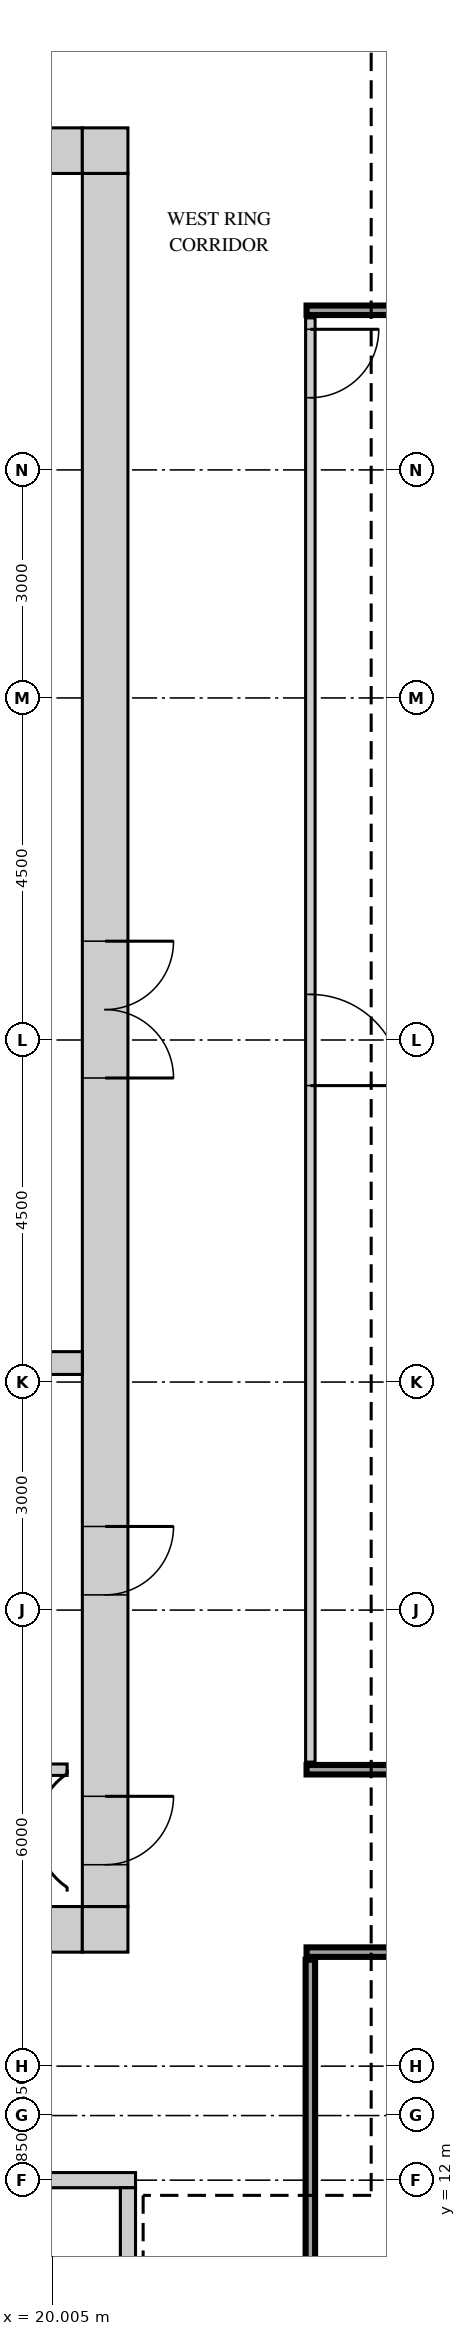
"""IFC4 building model, lengths in metres.
Left out: names, types, materials, properties, quantities, classifications, styles, units other than length and angle.
Written with IfcOpenShell. Run it as: python <this file> out.ifc"""

import sys

from ifc_helpers import new_model, si_unit, direction, frame, frame_2d, origin, place, context, subcontext, project, spatial, rectangle, extrude, source, transform, mapped, element, fill, save


model = new_model("IFC4")
c1 = context("Model", 3, precision=1e-05, world=origin(), true_north=direction((0.0, 1.0)))
c2 = subcontext(c1, "Body", "Model", "MODEL_VIEW")
j1 = project(units=[si_unit("LENGTHUNIT", "METRE"), si_unit("PLANEANGLEUNIT", "RADIAN")], contexts=[c1])
p1 = place(None, origin())
s1 = spatial("IfcSite", under=j1, at=p1, CompositionType="ELEMENT")
p2 = place(p1, origin())
s2 = spatial("IfcBuilding", under=s1, at=p2, CompositionType="ELEMENT")
p3 = place(p2, frame((0.0, 0.0, 322.2)))
s3 = spatial("IfcBuildingStorey", under=s2, at=p3, CompositionType="ELEMENT", Elevation=322.2)
m1 = source(origin(), c2, "Body", "SweptSolid", [
    extrude(rectangle(XDim=14.4, YDim=0.6, at=frame_2d((7.2, 0.0))), origin(), (0.0, 0.0, 1.0), 3.75),
])
p4 = place(p3, frame((6.0, 38.7, 0.0), z_axis=(0.0, 0.0, 1.0), x_axis=(1.0, 0.0, 0.0)))
e1 = element("IfcWall", 1, at=p4, inside=s3, PredefinedType="SHEAR", context=c2, shape_type="MappedRepresentation", body=[
    mapped(m1, transform((0.0, 0.0, 0.0))),
])
m2 = source(origin(), c2, "Body", "SweptSolid", [
    extrude(rectangle(XDim=0.9, YDim=2.1, at=frame_2d((0.45, 1.05))), frame((0.0, 0.31, 0.0), z_axis=(0.0, -1.0, 0.0), x_axis=(1.0, 0.0, 0.0)), (0.0, 0.0, 1.0), 0.62),
])
p5 = place(p4, frame((2.05, 0.0, 0.0)))
e2 = element("IfcOpeningElement", 2, at=p5, cuts=e1, PredefinedType="OPENING", context=c2, shape_type="MappedRepresentation", body=[
    mapped(m2, transform((0.0, 0.0, 0.0))),
])
p6 = place(p4, frame((5.45, 0.0, 0.0)))
e3 = element("IfcOpeningElement", 3, at=p6, cuts=e1, PredefinedType="OPENING", context=c2, shape_type="MappedRepresentation", body=[
    mapped(m2, transform((0.0, 0.0, 0.0))),
])
m3 = source(origin(), c2, "Body", "SweptSolid", [
    extrude(rectangle(XDim=1.0, YDim=2.1, at=frame_2d((0.5, 1.05))), frame((0.0, 0.31, 0.0), z_axis=(0.0, -1.0, 0.0), x_axis=(1.0, 0.0, 0.0)), (0.0, 0.0, 1.0), 0.62),
])
p7 = place(p4, frame((8.8, 0.0, 0.0)))
e4 = element("IfcOpeningElement", 4, at=p7, cuts=e1, PredefinedType="OPENING", context=c2, shape_type="MappedRepresentation", body=[
    mapped(m3, transform((0.0, 0.0, 0.0))),
])
p8 = place(p4, frame((12.15, 0.0, 0.0)))
e5 = element("IfcOpeningElement", 5, at=p8, cuts=e1, PredefinedType="OPENING", context=c2, shape_type="MappedRepresentation", body=[
    mapped(m2, transform((0.0, 0.0, 0.0))),
])
m4 = source(origin(), c2, "Body", "SweptSolid", [
    extrude(rectangle(XDim=0.6, YDim=0.6, at=frame_2d((0.3, 0.0))), origin(), (0.0, 0.0, 1.0), 3.75),
])
p9 = place(p3, frame((20.4, 38.7, 0.0), z_axis=(0.0, 0.0, 1.0), x_axis=(1.0, 0.0, 0.0)))
e6 = element("IfcWall", 6, at=p9, inside=s3, PredefinedType="SHEAR", context=c2, shape_type="MappedRepresentation", body=[
    mapped(m4, transform((0.0, 0.0, 0.0))),
])
p10 = place(p3, frame((6.0, 15.3, 0.0), z_axis=(0.0, 0.0, 1.0), x_axis=(1.0, 0.0, 0.0)))
e7 = element("IfcWall", 7, at=p10, inside=s3, PredefinedType="SHEAR", context=c2, shape_type="MappedRepresentation", body=[
    mapped(m1, transform((0.0, 0.0, 0.0))),
])
m5 = source(origin(), c2, "Body", "SweptSolid", [
    extrude(rectangle(XDim=1.2, YDim=2.1, at=frame_2d((0.6, 1.05))), frame((0.0, 0.31, 0.0), z_axis=(0.0, -1.0, 0.0), x_axis=(1.0, 0.0, 0.0)), (0.0, 0.0, 1.0), 0.62),
])
p11 = place(p10, frame((6.2, 0.0, 0.0)))
e8 = element("IfcOpeningElement", 8, at=p11, cuts=e7, PredefinedType="OPENING", context=c2, shape_type="MappedRepresentation", body=[
    mapped(m5, transform((0.0, 0.0, 0.0))),
])
p12 = place(p10, frame((2.85, 0.0, 0.0)))
e9 = element("IfcOpeningElement", 9, at=p12, cuts=e7, PredefinedType="OPENING", context=c2, shape_type="MappedRepresentation", body=[
    mapped(m5, transform((0.0, 0.0, 0.0))),
])
p13 = place(p10, frame((8.7, 0.0, 0.0)))
e10 = element("IfcOpeningElement", 10, at=p13, cuts=e7, PredefinedType="OPENING", context=c2, shape_type="MappedRepresentation", body=[
    mapped(m3, transform((0.0, 0.0, 0.0))),
])
p14 = place(p3, frame((20.4, 15.3, 0.0), z_axis=(0.0, 0.0, 1.0), x_axis=(1.0, 0.0, 0.0)))
e11 = element("IfcWall", 11, at=p14, inside=s3, PredefinedType="SHEAR", context=c2, shape_type="MappedRepresentation", body=[
    mapped(m4, transform((0.0, 0.0, 0.0))),
])
m6 = source(origin(), c2, "Body", "SweptSolid", [
    extrude(rectangle(XDim=22.8, YDim=0.6, at=frame_2d((11.4, 0.0))), origin(), (0.0, 0.0, 1.0), 3.75),
])
p15 = place(p3, frame((20.7, 15.6, 0.0), z_axis=(0.0, 0.0, 1.0), x_axis=(0.0, 1.0, 0.0)))
e12 = element("IfcWall", 12, at=p15, inside=s3, PredefinedType="SHEAR", context=c2, shape_type="MappedRepresentation", body=[
    mapped(m6, transform((0.0, 0.0, 0.0))),
])
m7 = source(origin(), c2, "Body", "SweptSolid", [
    extrude(rectangle(XDim=1.8, YDim=2.1, at=frame_2d((0.9, 1.05))), frame((0.0, 0.31, 0.0), z_axis=(0.0, -1.0, 0.0), x_axis=(1.0, 0.0, 0.0)), (0.0, 0.0, 1.0), 0.62),
])
p16 = place(p15, frame((10.9, 0.0, 0.0)))
e13 = element("IfcOpeningElement", 13, at=p16, cuts=e12, PredefinedType="OPENING", context=c2, shape_type="MappedRepresentation", body=[
    mapped(m7, transform((0.0, 0.0, 0.0))),
])
p17 = place(p15, frame((0.55, 0.0, 0.0)))
e14 = element("IfcOpeningElement", 14, at=p17, cuts=e12, PredefinedType="OPENING", context=c2, shape_type="MappedRepresentation", body=[
    mapped(m2, transform((0.0, 0.0, 0.0))),
])
p18 = place(p15, frame((4.1, 0.0, 0.0)))
e15 = element("IfcOpeningElement", 15, at=p18, cuts=e12, PredefinedType="OPENING", context=c2, shape_type="MappedRepresentation", body=[
    mapped(m2, transform((0.0, 0.0, 0.0))),
])
m8 = source(origin(), c2, "Body", "SweptSolid", [
    extrude(rectangle(XDim=7.2, YDim=0.2, at=frame_2d((3.6, 0.0))), origin(), (0.0, 0.0, 1.0), 3.75),
])
p19 = place(p3, frame((13.9, 12.0, 0.0), z_axis=(0.0, 0.0, 1.0), x_axis=(1.0, 0.0, 0.0)))
e16 = element("IfcWall", 16, at=p19, inside=s3, PredefinedType="SHEAR", context=c2, shape_type="MappedRepresentation", body=[
    mapped(m8, transform((0.0, 0.0, 0.0))),
])
m9 = source(origin(), c2, "Body", "SweptSolid", [
    extrude(rectangle(XDim=3.35, YDim=0.2, at=frame_2d((1.675, 0.0))), origin(), (0.0, 0.0, 1.0), 3.75),
])
p20 = place(p3, frame((21.0, 8.55, 0.0), z_axis=(0.0, 0.0, 1.0), x_axis=(0.0, 1.0, 0.0)))
e17 = element("IfcWall", 17, at=p20, inside=s3, PredefinedType="SHEAR", context=c2, shape_type="MappedRepresentation", body=[
    mapped(m9, transform((0.0, 0.0, 0.0))),
])
m10 = source(origin(), c2, "Body", "SweptSolid", [
    extrude(rectangle(XDim=13.2, YDim=0.3, at=frame_2d((6.6, 0.0))), origin(), (0.0, 0.0, 1.0), 3.75),
])
p21 = place(p3, frame((7.2, 22.75, 0.0), z_axis=(0.0, 0.0, 1.0), x_axis=(1.0, 0.0, 0.0)))
e18 = element("IfcWall", 18, at=p21, inside=s3, PredefinedType="STANDARD", context=c2, shape_type="MappedRepresentation", body=[
    mapped(m10, transform((0.0, 0.0, 0.0))),
])
m11 = source(origin(), c2, "Body", "SweptSolid", [
    extrude(rectangle(XDim=8.75, YDim=0.125, at=frame_2d((4.375, 0.0))), origin(), (0.0, 0.0, 1.0), 3.8),
])
p22 = place(p3, frame((23.4, 6.15, 0.0), z_axis=(0.0, 0.0, 1.0), x_axis=(0.0, 1.0, 0.0)))
e19 = element("IfcWall", 19, at=p22, inside=s3, PredefinedType="PARTITIONING", context=c2, shape_type="MappedRepresentation", body=[
    mapped(m11, transform((0.0, 0.0, 0.0))),
])
m12 = source(origin(), c2, "Body", "SweptSolid", [
    extrude(rectangle(XDim=19.1, YDim=0.125, at=frame_2d((9.55, 0.0))), origin(), (0.0, 0.0, 1.0), 3.8),
])
p23 = place(p3, frame((23.35, 15.0, 0.0), z_axis=(0.0, 0.0, 1.0), x_axis=(1.0, 0.0, 0.0)))
e20 = element("IfcWall", 20, at=p23, inside=s3, PredefinedType="PARTITIONING", context=c2, shape_type="MappedRepresentation", body=[
    mapped(m12, transform((0.0, 0.0, 0.0))),
])
m13 = source(origin(), c2, "Body", "SweptSolid", [
    extrude(rectangle(XDim=0.9, YDim=2.1, at=frame_2d((0.45, 1.05))), frame((0.0, 0.073, 0.0), z_axis=(0.0, -1.0, 0.0), x_axis=(1.0, 0.0, 0.0)), (0.0, 0.0, 1.0), 0.145),
])
p24 = place(p23, frame((5.3, 0.0, 0.0)))
e21 = element("IfcOpeningElement", 21, at=p24, cuts=e20, PredefinedType="OPENING", context=c2, shape_type="MappedRepresentation", body=[
    mapped(m13, transform((0.0, 0.0, 0.0))),
])
p25 = place(p23, frame((13.3, 0.0, 0.0)))
e22 = element("IfcOpeningElement", 22, at=p25, cuts=e20, PredefinedType="OPENING", context=c2, shape_type="MappedRepresentation", body=[
    mapped(m13, transform((0.0, 0.0, 0.0))),
])
m14 = source(origin(), c2, "Body", "SweptSolid", [
    extrude(rectangle(XDim=4.0, YDim=0.15, at=frame_2d((2.0, 0.0))), origin(), (0.0, 0.0, 1.0), 3.8),
])
p26 = place(p3, frame((16.2, 17.4, 0.0), z_axis=(0.0, 0.0, 1.0), x_axis=(1.0, 0.0, 0.0)))
e23 = element("IfcWall", 23, at=p26, inside=s3, PredefinedType="PARTITIONING", context=c2, shape_type="MappedRepresentation", body=[
    mapped(m14, transform((0.0, 0.0, 0.0))),
])
m15 = source(origin(), c2, "Body", "SweptSolid", [
    extrude(rectangle(XDim=16.7, YDim=0.125, at=frame_2d((8.35, 0.0))), origin(), (0.0, 0.0, 1.0), 3.8),
])
p27 = place(p3, frame((23.35, 17.4, 0.0), z_axis=(0.0, 0.0, 1.0), x_axis=(1.0, 0.0, 0.0)))
e24 = element("IfcWall", 24, at=p27, inside=s3, PredefinedType="PARTITIONING", context=c2, shape_type="MappedRepresentation", body=[
    mapped(m15, transform((0.0, 0.0, 0.0))),
])
m16 = source(origin(), c2, "Body", "SweptSolid", [
    extrude(rectangle(XDim=19.0, YDim=0.125, at=frame_2d((9.5, 0.0))), origin(), (0.0, 0.0, 1.0), 3.8),
])
p28 = place(p3, frame((23.4, 17.5, 0.0), z_axis=(0.0, 0.0, 1.0), x_axis=(0.0, 1.0, 0.0)))
e25 = element("IfcWall", 25, at=p28, inside=s3, PredefinedType="PARTITIONING", context=c2, shape_type="MappedRepresentation", body=[
    mapped(m16, transform((0.0, 0.0, 0.0))),
])
m17 = source(origin(), c2, "Body", "SweptSolid", [
    extrude(rectangle(XDim=1.2, YDim=2.1, at=frame_2d((0.6, 1.05))), frame((0.0, 0.073, 0.0), z_axis=(0.0, -1.0, 0.0), x_axis=(1.0, 0.0, 0.0)), (0.0, 0.0, 1.0), 0.145),
])
p29 = place(p28, frame((8.9, 0.0, 0.0)))
e26 = element("IfcOpeningElement", 26, at=p29, cuts=e25, PredefinedType="OPENING", context=c2, shape_type="MappedRepresentation", body=[
    mapped(m17, transform((0.0, 0.0, 0.0))),
])
p30 = place(p28, frame((17.95, 0.0, 0.0)))
e27 = element("IfcOpeningElement", 27, at=p30, cuts=e25, PredefinedType="OPENING", context=c2, shape_type="MappedRepresentation", body=[
    mapped(m13, transform((0.0, 0.0, 0.0))),
])
p31 = place(p3, frame((23.35, 36.6, 0.0), z_axis=(0.0, 0.0, 1.0), x_axis=(1.0, 0.0, 0.0)))
e28 = element("IfcWall", 28, at=p31, inside=s3, PredefinedType="PARTITIONING", context=c2, shape_type="MappedRepresentation", body=[
    mapped(m15, transform((0.0, 0.0, 0.0))),
])
m18 = source(origin(), c2, "Body", "SweptSolid", [
    extrude(rectangle(XDim=1.8, YDim=2.1, at=frame_2d((0.9, 1.05))), frame((0.0, 0.25, 0.0), z_axis=(0.0, -1.0, 0.0), x_axis=(1.0, 0.0, 0.0)), (0.0, 0.0, 1.0), 0.5),
])
p32 = place(p16, origin())
e29 = element("IfcDoor", 29, at=p32, inside=s3, OperationType="DOUBLE_DOOR_SINGLE_SWING", PredefinedType="DOOR", context=c2, shape_type="MappedRepresentation", body=[
    mapped(m18, transform((0.0, 0.0, 0.0))),
])
fill(e13, e29)
m19 = source(origin(), c2, "Body", "SweptSolid", [
    extrude(rectangle(XDim=0.9, YDim=2.1, at=frame_2d((0.45, 1.05))), frame((0.0, 0.25, 0.0), z_axis=(0.0, -1.0, 0.0), x_axis=(1.0, 0.0, 0.0)), (0.0, 0.0, 1.0), 0.5),
])
p33 = place(p17, origin())
e30 = element("IfcDoor", 30, at=p33, inside=s3, OperationType="SINGLE_SWING_RIGHT", PredefinedType="DOOR", context=c2, shape_type="MappedRepresentation", body=[
    mapped(m19, transform((0.0, 0.0, 0.0))),
])
fill(e14, e30)
p34 = place(p18, origin())
e31 = element("IfcDoor", 31, at=p34, inside=s3, OperationType="SINGLE_SWING_RIGHT", PredefinedType="DOOR", context=c2, shape_type="MappedRepresentation", body=[
    mapped(m19, transform((0.0, 0.0, 0.0))),
])
fill(e15, e31)
m20 = source(origin(), c2, "Body", "SweptSolid", [
    extrude(rectangle(XDim=1.2, YDim=2.1, at=frame_2d((0.6, 1.05))), frame((0.0, 0.025, 0.0), z_axis=(0.0, -1.0, 0.0), x_axis=(1.0, 0.0, 0.0)), (0.0, 0.0, 1.0), 0.05),
])
p35 = place(p29, origin())
e32 = element("IfcDoor", 32, at=p35, inside=s3, OperationType="SINGLE_SWING_LEFT", PredefinedType="DOOR", context=c2, shape_type="MappedRepresentation", body=[
    mapped(m20, transform((0.0, 0.0, 0.0))),
])
fill(e26, e32)
m21 = source(origin(), c2, "Body", "SweptSolid", [
    extrude(rectangle(XDim=0.9, YDim=2.1, at=frame_2d((0.45, 1.05))), frame((0.0, 0.025, 0.0), z_axis=(0.0, -1.0, 0.0), x_axis=(1.0, 0.0, 0.0)), (0.0, 0.0, 1.0), 0.05),
])
p36 = place(p30, origin())
e33 = element("IfcDoor", 33, at=p36, inside=s3, OperationType="SINGLE_SWING_RIGHT", PredefinedType="DOOR", context=c2, shape_type="MappedRepresentation", body=[
    mapped(m21, transform((0.0, 0.0, 0.0))),
])
fill(e27, e33)
save(model, sys.argv[1])
